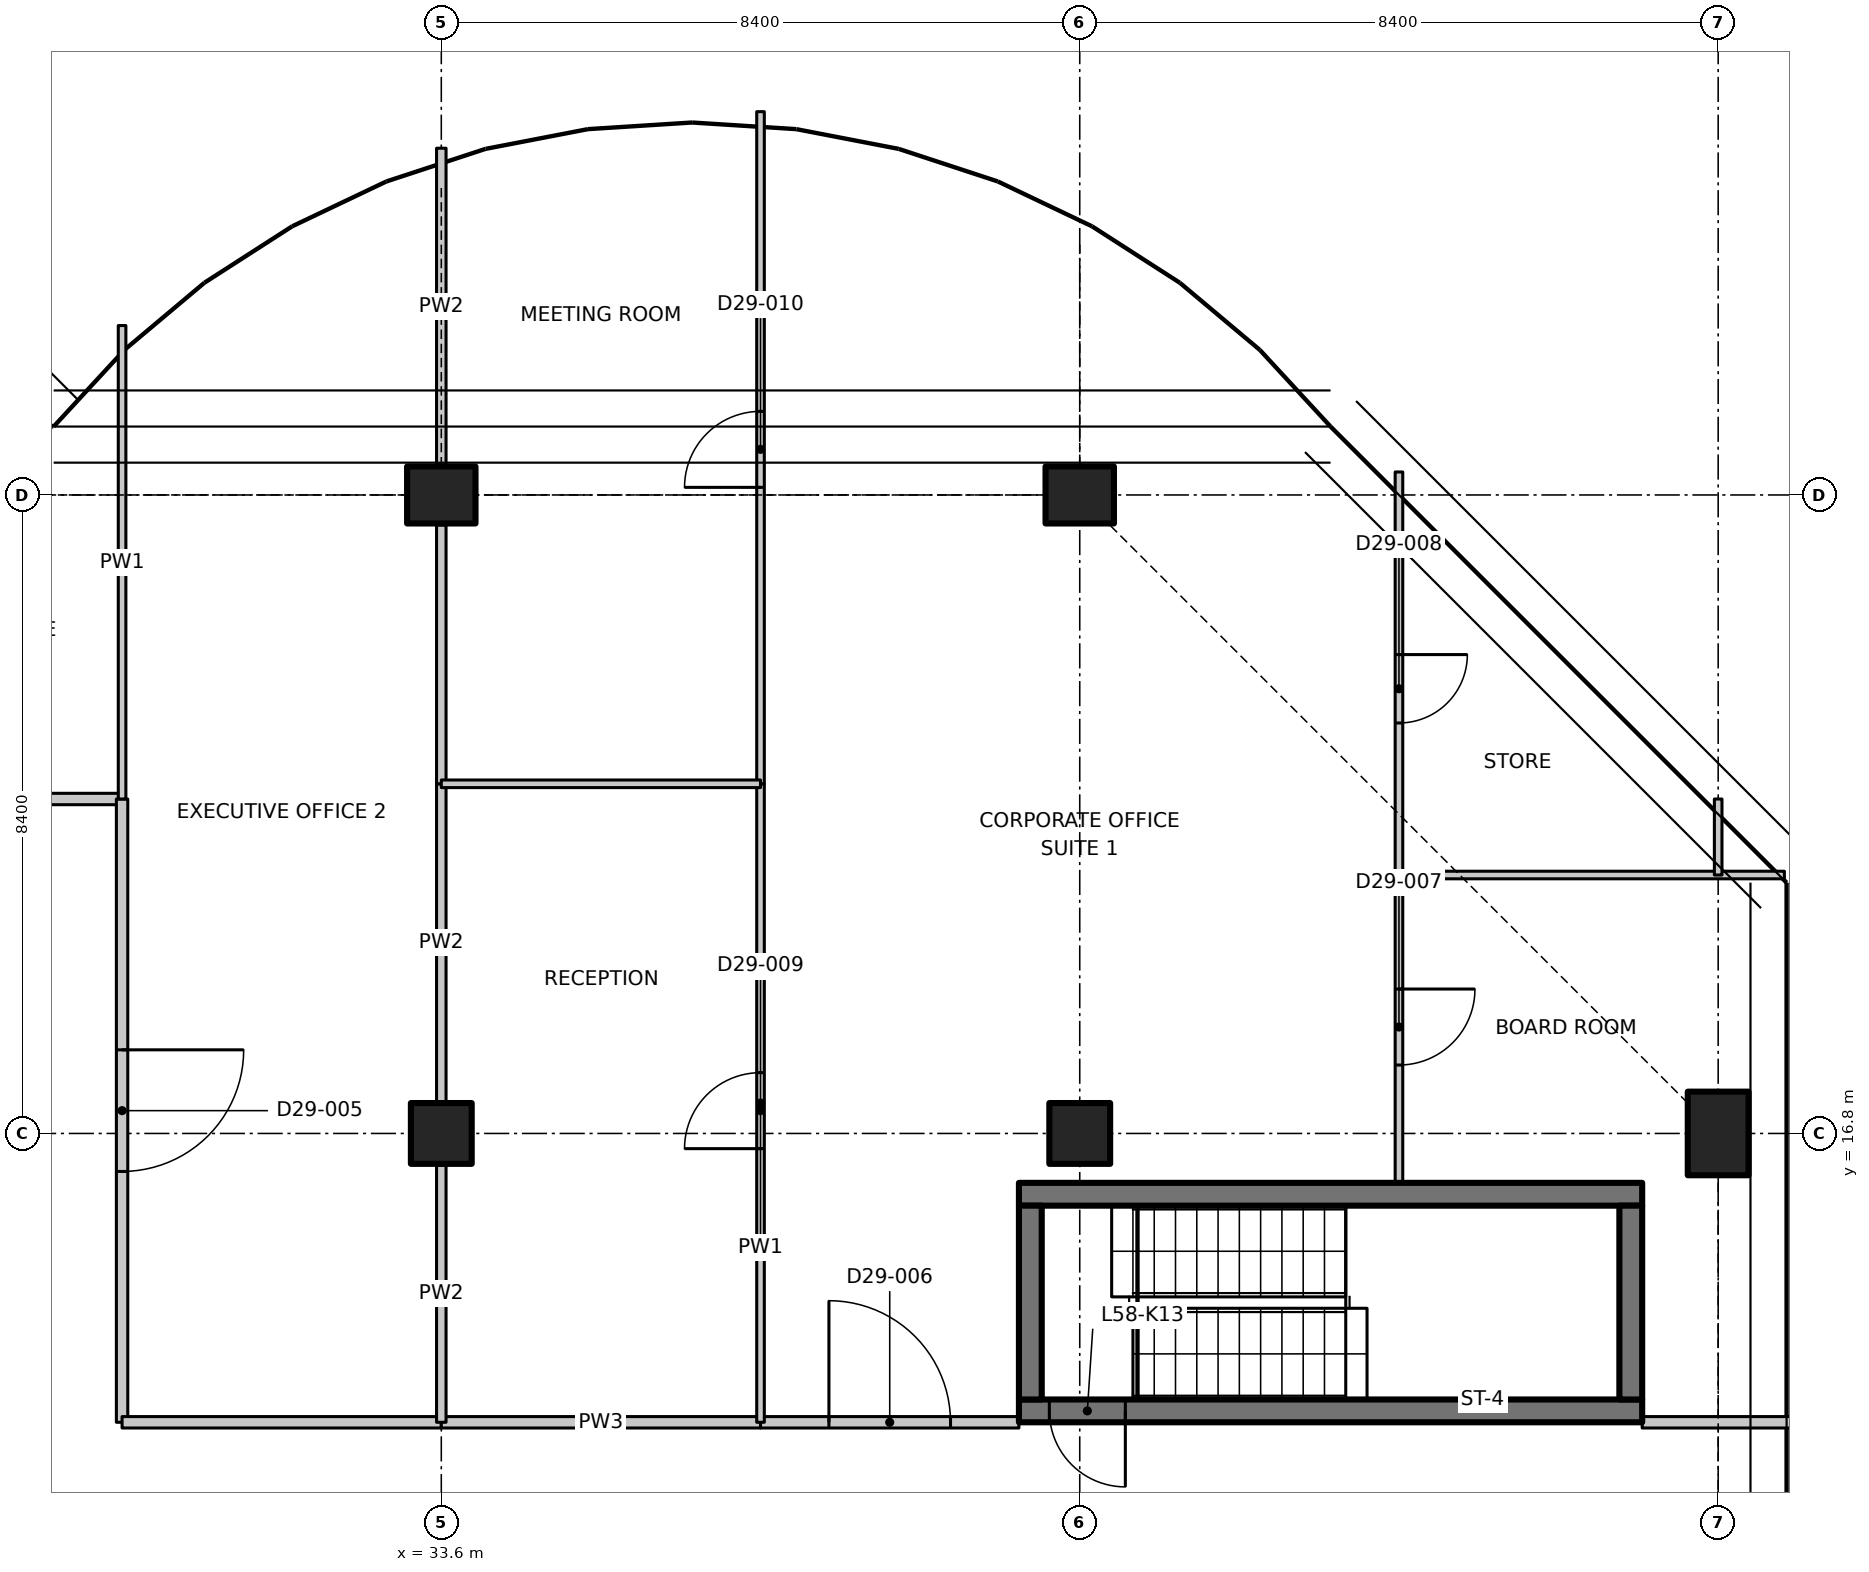
"""IFC4 building model, lengths in metres.
Left out: names, types, materials, properties, quantities, classifications, styles, units other than length and angle.
Written with IfcOpenShell. Run it as: python <this file> out.ifc"""

import sys

from ifc_helpers import new_model, si_unit, direction, frame, frame_2d, origin, origin_2d, place, context, subcontext, project, spatial, polyline, rectangle, outline, extrude, element, fill, save


model = new_model("IFC4")
c1 = context("Model", 3, precision=1e-05, world=origin(), true_north=direction((0.0, 1.0)))
c2 = subcontext(c1, "Body", "Model", "MODEL_VIEW")
j1 = project(units=[si_unit("LENGTHUNIT", "METRE"), si_unit("PLANEANGLEUNIT", "RADIAN")], contexts=[c1])
p1 = place(None, origin())
s1 = spatial("IfcSite", under=j1, at=p1, CompositionType="ELEMENT")
p2 = place(p1, origin())
s2 = spatial("IfcBuilding", under=s1, at=p2, CompositionType="ELEMENT")
p3 = place(p2, frame((0.0, 0.0, 230.1)))
s3 = spatial("IfcBuildingStorey", under=s2, at=p3, CompositionType="ELEMENT", Elevation=230.1)
p4 = place(p3, frame((33.6, 16.8, 0.0), z_axis=(0.0, 0.0, 1.0), x_axis=(1.0, 0.0, 0.0)))
e1 = element("IfcColumn", 1, at=p4, inside=s3, PredefinedType="COLUMN", context=c2, shape_type="SweptSolid", body=[
    extrude(rectangle(XDim=0.8, YDim=0.8, at=origin_2d()), origin(), (0.0, 0.0, 1.0), 3.35),
])
p5 = place(p3, frame((33.6, 25.2, 0.0), z_axis=(0.0, 0.0, 1.0), x_axis=(0.0, 1.0, 0.0)))
e2 = element("IfcColumn", 2, at=p5, inside=s3, PredefinedType="COLUMN", context=c2, shape_type="SweptSolid", body=[
    extrude(rectangle(XDim=0.75, YDim=0.9, at=origin_2d()), origin(), (0.0, 0.0, 1.0), 3.35),
])
p6 = place(p3, frame((42.0, 16.8, 0.0), z_axis=(0.0, 0.0, 1.0), x_axis=(1.0, 0.0, 0.0)))
e3 = element("IfcColumn", 3, at=p6, inside=s3, PredefinedType="COLUMN", context=c2, shape_type="SweptSolid", body=[
    extrude(rectangle(XDim=0.8, YDim=0.8, at=origin_2d()), origin(), (0.0, 0.0, 1.0), 3.35),
])
p7 = place(p3, frame((42.0, 25.2, 0.0), z_axis=(0.0, 0.0, 1.0), x_axis=(0.0, 1.0, 0.0)))
e4 = element("IfcColumn", 4, at=p7, inside=s3, PredefinedType="COLUMN", context=c2, shape_type="SweptSolid", body=[
    extrude(rectangle(XDim=0.75, YDim=0.9, at=origin_2d()), origin(), (0.0, 0.0, 1.0), 3.35),
])
p8 = place(p3, frame((50.4, 16.8, 0.0), z_axis=(0.0, 0.0, 1.0), x_axis=(1.0, 0.0, 0.0)))
e5 = element("IfcColumn", 5, at=p8, inside=s3, PredefinedType="COLUMN", context=c2, shape_type="SweptSolid", body=[
    extrude(rectangle(XDim=0.8, YDim=1.1, at=origin_2d()), origin(), (0.0, 0.0, 1.0), 3.35),
])
p9 = place(p3, frame((49.4, 13.15, 0.0), z_axis=(0.0, 0.0, 1.0), x_axis=(-1.0, 0.0, 0.0)))
e6 = element("IfcWall", 6, at=p9, inside=s3, PredefinedType="SHEAR", context=c2, shape_type="SweptSolid", body=[
    extrude(rectangle(XDim=8.2, YDim=0.3, at=frame_2d((4.1, 0.0))), origin(), (0.0, 0.0, 1.0), 3.35),
])
p10 = place(p9, frame((6.8, 0.0, 0.0)))
e7 = element("IfcOpeningElement", 7, at=p10, cuts=e6, PredefinedType="OPENING", context=c2, shape_type="SweptSolid", body=[
    extrude(rectangle(XDim=1.0, YDim=2.1, at=frame_2d((0.5, 1.05))), frame((0.0, 0.16, 0.0), z_axis=(0.0, -1.0, 0.0), x_axis=(1.0, 0.0, 0.0)), (0.0, 0.0, 1.0), 0.32),
])
p11 = place(p3, frame((41.2, 16.0, 0.0), z_axis=(0.0, 0.0, 1.0), x_axis=(1.0, 0.0, 0.0)))
e8 = element("IfcWall", 8, at=p11, inside=s3, PredefinedType="SHEAR", context=c2, shape_type="SweptSolid", body=[
    extrude(rectangle(XDim=8.2, YDim=0.3, at=frame_2d((4.1, 0.0))), origin(), (0.0, 0.0, 1.0), 3.35),
])
for number, where, z_axis, x_axis in (
    (9, (41.35, 13.3, 0.0), (0.0, 0.0, 1.0), (0.0, 1.0, 0.0)),
    (10, (49.25, 13.3, 0.0), (0.0, 0.0, 1.0), (0.0, 1.0, 0.0)),
):
    element("IfcWall", number, at=place(p3, frame(where, z_axis=z_axis, x_axis=x_axis)), inside=s3, PredefinedType="SHEAR", context=c2, shape_type="SweptSolid", body=[
        extrude(rectangle(XDim=2.55, YDim=0.3, at=frame_2d((1.275, 0.0))), origin(), (0.0, 0.0, 1.0), 3.35),
    ])
p12 = place(p3, frame((25.2, 21.2, 0.0), z_axis=(0.0, 0.0, 1.0), x_axis=(1.0, 0.0, 0.0)))
e11 = element("IfcWall", 11, at=p12, inside=s3, PredefinedType="PARTITIONING", context=c2, shape_type="SweptSolid", body=[
    extrude(rectangle(XDim=4.2, YDim=0.15, at=frame_2d((2.1, 0.0))), origin(), (0.0, 0.0, 1.0), 3.33),
])
p13 = place(p12, frame((1.5, 0.0, 0.0)))
e12 = element("IfcOpeningElement", 12, at=p13, cuts=e11, PredefinedType="OPENING", context=c2, shape_type="SweptSolid", body=[
    extrude(rectangle(XDim=1.0, YDim=2.1, at=frame_2d((0.5, 1.05))), frame((0.0, 0.085, 0.0), z_axis=(0.0, -1.0, 0.0), x_axis=(1.0, 0.0, 0.0)), (0.0, 0.0, 1.0), 0.17),
])
p14 = place(p3, frame((29.4, 21.2, 0.0), z_axis=(0.0, 0.0, 1.0), x_axis=(0.0, -1.0, 0.0)))
e13 = element("IfcWall", 13, at=p14, inside=s3, PredefinedType="PARTITIONING", context=c2, shape_type="SweptSolid", body=[
    extrude(rectangle(XDim=8.2, YDim=0.15, at=frame_2d((4.1, 0.0))), origin(), (0.0, 0.0, 1.0), 3.33),
])
p15 = place(p14, frame((3.3, 0.0, 0.0)))
e14 = element("IfcOpeningElement", 14, at=p15, cuts=e13, PredefinedType="OPENING", context=c2, shape_type="SweptSolid", body=[
    extrude(rectangle(XDim=1.6, YDim=2.1, at=frame_2d((0.8, 1.05))), frame((0.0, 0.085, 0.0), z_axis=(0.0, -1.0, 0.0), x_axis=(1.0, 0.0, 0.0)), (0.0, 0.0, 1.0), 0.17),
])
p16 = place(p3, frame((29.4, 27.429, 0.0), z_axis=(0.0, 0.0, 1.0), x_axis=(0.0, -1.0, 0.0)))
e15 = element("IfcWall", 15, at=p16, inside=s3, PredefinedType="PARTITIONING", context=c2, shape_type="SweptSolid", body=[
    extrude(outline(polyline([(0.0, 0.0), (6.229, 0.0), (6.229, 3.33), (2.679, 3.33), (2.677, 2.98), (1.781, 2.98), (1.779, 3.33), (0.154, 3.33), (0.0, 3.33), (0.0, 0.0)])), frame((0.0, 0.05, 0.0), z_axis=(0.0, -1.0, 0.0), x_axis=(1.0, 0.0, 0.0)), (0.0, 0.0, 1.0), 0.1),
])
p17 = place(p3, frame((29.4, 13.0, 0.0), z_axis=(0.0, 0.0, 1.0), x_axis=(1.0, 0.0, 0.0)))
e16 = element("IfcWall", 16, at=p17, inside=s3, PredefinedType="PARTITIONING", context=c2, shape_type="SweptSolid", body=[
    extrude(rectangle(XDim=4.2, YDim=0.15, at=frame_2d((2.1, 0.0))), origin(), (0.0, 0.0, 1.0), 3.33),
])
p18 = place(p3, frame((37.8, 13.0, 0.0), z_axis=(0.0, 0.0, 1.0), x_axis=(1.0, 0.0, 0.0)))
e17 = element("IfcWall", 17, at=p18, inside=s3, PredefinedType="PARTITIONING", context=c2, shape_type="SweptSolid", body=[
    extrude(rectangle(XDim=3.4, YDim=0.15, at=frame_2d((1.7, 0.0))), origin(), (0.0, 0.0, 1.0), 3.33),
])
p19 = place(p18, frame((0.9, 0.0, 0.0)))
e18 = element("IfcOpeningElement", 18, at=p19, cuts=e17, PredefinedType="OPENING", context=c2, shape_type="SweptSolid", body=[
    extrude(rectangle(XDim=1.6, YDim=2.1, at=frame_2d((0.8, 1.05))), frame((0.0, 0.085, 0.0), z_axis=(0.0, -1.0, 0.0), x_axis=(1.0, 0.0, 0.0)), (0.0, 0.0, 1.0), 0.17),
])
p20 = place(p3, frame((49.4, 13.0, 0.0), z_axis=(0.0, 0.0, 1.0), x_axis=(1.0, 0.0, 0.0)))
e19 = element("IfcWall", 19, at=p20, inside=s3, PredefinedType="PARTITIONING", context=c2, shape_type="SweptSolid", body=[
    extrude(rectangle(XDim=2.42, YDim=0.15, at=frame_2d((1.21, 0.0))), origin(), (0.0, 0.0, 1.0), 2.98),
])
p21 = place(p3, frame((33.6, 13.0, 0.0), z_axis=(0.0, 0.0, 1.0), x_axis=(1.0, 0.0, 0.0)))
e20 = element("IfcWall", 20, at=p21, inside=s3, PredefinedType="PARTITIONING", context=c2, shape_type="SweptSolid", body=[
    extrude(rectangle(XDim=4.2, YDim=0.15, at=frame_2d((2.1, 0.0))), origin(), (0.0, 0.0, 1.0), 3.33),
])
p22 = place(p3, frame((33.6, 21.4, 0.0), z_axis=(0.0, 0.0, 1.0), x_axis=(0.0, -1.0, 0.0)))
e21 = element("IfcWall", 21, at=p22, inside=s3, PredefinedType="PARTITIONING", context=c2, shape_type="SweptSolid", body=[
    extrude(rectangle(XDim=4.18, YDim=0.125, at=frame_2d((2.09, 0.0))), origin(), (0.0, 0.0, 1.0), 3.33),
])
p23 = place(p3, frame((33.6, 16.38, 0.0), z_axis=(0.0, 0.0, 1.0), x_axis=(0.0, -1.0, 0.0)))
e22 = element("IfcWall", 22, at=p23, inside=s3, PredefinedType="PARTITIONING", context=c2, shape_type="SweptSolid", body=[
    extrude(rectangle(XDim=3.38, YDim=0.125, at=frame_2d((1.69, 0.0))), origin(), (0.0, 0.0, 1.0), 3.33),
])
p24 = place(p3, frame((33.6, 29.762, 0.0), z_axis=(0.0, 0.0, 1.0), x_axis=(0.0, -1.0, 0.0)))
e23 = element("IfcWall", 23, at=p24, inside=s3, PredefinedType="PARTITIONING", context=c2, shape_type="SweptSolid", body=[
    extrude(rectangle(XDim=4.167, YDim=0.125, at=frame_2d((2.083, 0.0))), origin(), (0.0, 0.0, 1.0), 2.98),
])
p25 = place(p3, frame((33.6, 24.805, 0.0), z_axis=(0.0, 0.0, 1.0), x_axis=(0.0, -1.0, 0.0)))
e24 = element("IfcWall", 24, at=p25, inside=s3, PredefinedType="PARTITIONING", context=c2, shape_type="SweptSolid", body=[
    extrude(rectangle(XDim=3.405, YDim=0.125, at=frame_2d((1.703, 0.0))), origin(), (0.0, 0.0, 1.0), 2.98),
])
p26 = place(p3, frame((46.2, 20.2, 0.0), z_axis=(0.0, 0.0, 1.0), x_axis=(0.0, -1.0, 0.0)))
e25 = element("IfcWall", 25, at=p26, inside=s3, PredefinedType="PARTITIONING", context=c2, shape_type="SweptSolid", body=[
    extrude(rectangle(XDim=4.05, YDim=0.1, at=frame_2d((2.025, 0.0))), origin(), (0.0, 0.0, 1.0), 3.33),
])
p27 = place(p26, frame((1.5, 0.0, 0.0)))
e26 = element("IfcOpeningElement", 26, at=p27, cuts=e25, PredefinedType="OPENING", context=c2, shape_type="SweptSolid", body=[
    extrude(rectangle(XDim=1.0, YDim=2.1, at=frame_2d((0.5, 1.05))), frame((0.0, 0.06, 0.0), z_axis=(0.0, -1.0, 0.0), x_axis=(1.0, 0.0, 0.0)), (0.0, 0.0, 1.0), 0.12),
])
p28 = place(p3, frame((46.2, 25.502, 0.0), z_axis=(0.0, 0.0, 1.0), x_axis=(0.0, -1.0, 0.0)))
e27 = element("IfcWall", 27, at=p28, inside=s3, PredefinedType="PARTITIONING", context=c2, shape_type="SweptSolid", body=[
    extrude(outline(polyline([(0.0, 0.0), (5.302, 0.0), (5.302, 3.33), (5.168, 3.33), (5.166, 2.98), (3.839, 2.98), (3.837, 3.33), (0.103, 3.33), (0.0, 3.33), (0.0, 0.0)])), frame((0.0, 0.05, 0.0), z_axis=(0.0, -1.0, 0.0), x_axis=(1.0, 0.0, 0.0)), (0.0, 0.0, 1.0), 0.1),
])
p29 = place(p28, frame((2.403, 0.0, 0.0)))
e28 = element("IfcOpeningElement", 28, at=p29, cuts=e27, PredefinedType="OPENING", context=c2, shape_type="SweptSolid", body=[
    extrude(rectangle(XDim=0.9, YDim=2.1, at=frame_2d((0.45, 1.05))), frame((0.0, 0.06, 0.0), z_axis=(0.0, -1.0, 0.0), x_axis=(1.0, 0.0, 0.0)), (0.0, 0.0, 1.0), 0.12),
])
p30 = place(p3, frame((37.8, 13.0, 0.0), z_axis=(0.0, 0.0, 1.0), x_axis=(0.0, 1.0, 0.0)))
e29 = element("IfcWall", 29, at=p30, inside=s3, PredefinedType="PARTITIONING", context=c2, shape_type="SweptSolid", body=[
    extrude(rectangle(XDim=8.4, YDim=0.1, at=frame_2d((4.2, 0.0))), origin(), (0.0, 0.0, 1.0), 3.33),
])
p31 = place(p30, frame((3.6, 0.0, 0.0)))
e30 = element("IfcOpeningElement", 30, at=p31, cuts=e29, PredefinedType="OPENING", context=c2, shape_type="SweptSolid", body=[
    extrude(rectangle(XDim=1.0, YDim=2.1, at=frame_2d((0.5, 1.05))), frame((0.0, 0.06, 0.0), z_axis=(0.0, -1.0, 0.0), x_axis=(1.0, 0.0, 0.0)), (0.0, 0.0, 1.0), 0.12),
])
p32 = place(p3, frame((37.8, 21.4, 0.0), z_axis=(0.0, 0.0, 1.0), x_axis=(0.0, 1.0, 0.0)))
e31 = element("IfcWall", 31, at=p32, inside=s3, PredefinedType="PARTITIONING", context=c2, shape_type="SweptSolid", body=[
    extrude(outline(polyline([(0.0, 0.0), (8.843, 0.0), (8.843, 3.33), (4.25, 3.33), (4.248, 2.98), (3.352, 2.98), (3.35, 3.33), (0.0, 3.33), (0.0, 0.0)])), frame((0.0, 0.05, 0.0), z_axis=(0.0, -1.0, 0.0), x_axis=(1.0, 0.0, 0.0)), (0.0, 0.0, 1.0), 0.1),
])
p33 = place(p32, frame((3.9, 0.0, 0.0)))
e32 = element("IfcOpeningElement", 32, at=p33, cuts=e31, PredefinedType="OPENING", context=c2, shape_type="SweptSolid", body=[
    extrude(rectangle(XDim=1.0, YDim=2.1, at=frame_2d((0.5, 1.05))), frame((0.0, 0.06, 0.0), z_axis=(0.0, -1.0, 0.0), x_axis=(1.0, 0.0, 0.0)), (0.0, 0.0, 1.0), 0.12),
])
p34 = place(p3, frame((46.2, 20.2, 0.0), z_axis=(0.0, 0.0, 1.0), x_axis=(1.0, 0.0, 0.0)))
e33 = element("IfcWall", 33, at=p34, inside=s3, PredefinedType="PARTITIONING", context=c2, shape_type="SweptSolid", body=[
    extrude(rectangle(XDim=5.071, YDim=0.1, at=frame_2d((2.536, 0.0))), origin(), (0.0, 0.0, 1.0), 2.98),
])
p35 = place(p3, frame((50.4, 20.2, 0.0), z_axis=(0.0, 0.0, 1.0), x_axis=(0.0, 1.0, 0.0)))
e34 = element("IfcWall", 34, at=p35, inside=s3, PredefinedType="PARTITIONING", context=c2, shape_type="SweptSolid", body=[
    extrude(rectangle(XDim=1.0, YDim=0.1, at=frame_2d((0.5, 0.0))), origin(), (0.0, 0.0, 1.0), 3.33),
])
p36 = place(p3, frame((33.6, 21.4, 0.0), z_axis=(0.0, 0.0, 1.0), x_axis=(1.0, 0.0, 0.0)))
e35 = element("IfcWall", 35, at=p36, inside=s3, PredefinedType="PARTITIONING", context=c2, shape_type="SweptSolid", body=[
    extrude(rectangle(XDim=4.2, YDim=0.1, at=frame_2d((2.1, 0.0))), origin(), (0.0, 0.0, 1.0), 3.33),
])
p37 = place(p10, origin())
e36 = element("IfcDoor", 36, at=p37, inside=s3, OperationType="SINGLE_SWING_RIGHT", PredefinedType="DOOR", context=c2, shape_type="SweptSolid", body=[
    extrude(rectangle(XDim=1.0, YDim=2.1, at=frame_2d((0.5, 1.05))), frame((0.0, 0.025, 0.0), z_axis=(0.0, -1.0, 0.0), x_axis=(1.0, 0.0, 0.0)), (0.0, 0.0, 1.0), 0.05),
])
fill(e7, e36)
p38 = place(p15, origin())
e37 = element("IfcDoor", 37, at=p38, inside=s3, OperationType="DOUBLE_DOOR_SINGLE_SWING", PredefinedType="DOOR", context=c2, shape_type="SweptSolid", body=[
    extrude(rectangle(XDim=1.6, YDim=2.1, at=frame_2d((0.8, 1.05))), frame((0.0, 0.025, 0.0), z_axis=(0.0, -1.0, 0.0), x_axis=(1.0, 0.0, 0.0)), (0.0, 0.0, 1.0), 0.05),
])
fill(e14, e37)
p39 = place(p19, origin())
e38 = element("IfcDoor", 38, at=p39, inside=s3, OperationType="DOUBLE_DOOR_SINGLE_SWING", PredefinedType="DOOR", context=c2, shape_type="SweptSolid", body=[
    extrude(rectangle(XDim=1.6, YDim=2.1, at=frame_2d((0.8, 1.05))), frame((0.0, 0.025, 0.0), z_axis=(0.0, -1.0, 0.0), x_axis=(1.0, 0.0, 0.0)), (0.0, 0.0, 1.0), 0.05),
])
fill(e18, e38)
p40 = place(p27, origin())
e39 = element("IfcDoor", 39, at=p40, inside=s3, OperationType="SINGLE_SWING_LEFT", PredefinedType="DOOR", context=c2, shape_type="SweptSolid", body=[
    extrude(rectangle(XDim=1.0, YDim=2.1, at=frame_2d((0.5, 1.05))), frame((0.0, 0.025, 0.0), z_axis=(0.0, -1.0, 0.0), x_axis=(1.0, 0.0, 0.0)), (0.0, 0.0, 1.0), 0.05),
])
fill(e26, e39)
p41 = place(p29, origin())
e40 = element("IfcDoor", 40, at=p41, inside=s3, OperationType="SINGLE_SWING_LEFT", PredefinedType="DOOR", context=c2, shape_type="SweptSolid", body=[
    extrude(rectangle(XDim=0.9, YDim=2.1, at=frame_2d((0.45, 1.05))), frame((0.0, 0.025, 0.0), z_axis=(0.0, -1.0, 0.0), x_axis=(1.0, 0.0, 0.0)), (0.0, 0.0, 1.0), 0.05),
])
fill(e28, e40)
p42 = place(p31, origin())
e41 = element("IfcDoor", 41, at=p42, inside=s3, OperationType="SINGLE_SWING_LEFT", PredefinedType="DOOR", context=c2, shape_type="SweptSolid", body=[
    extrude(rectangle(XDim=1.0, YDim=2.1, at=frame_2d((0.5, 1.05))), frame((0.0, 0.025, 0.0), z_axis=(0.0, -1.0, 0.0), x_axis=(1.0, 0.0, 0.0)), (0.0, 0.0, 1.0), 0.05),
])
fill(e30, e41)
p43 = place(p33, origin())
e42 = element("IfcDoor", 42, at=p43, inside=s3, OperationType="SINGLE_SWING_LEFT", PredefinedType="DOOR", context=c2, shape_type="SweptSolid", body=[
    extrude(rectangle(XDim=1.0, YDim=2.1, at=frame_2d((0.5, 1.05))), frame((0.0, 0.025, 0.0), z_axis=(0.0, -1.0, 0.0), x_axis=(1.0, 0.0, 0.0)), (0.0, 0.0, 1.0), 0.05),
])
fill(e32, e42)
save(model, sys.argv[1])
